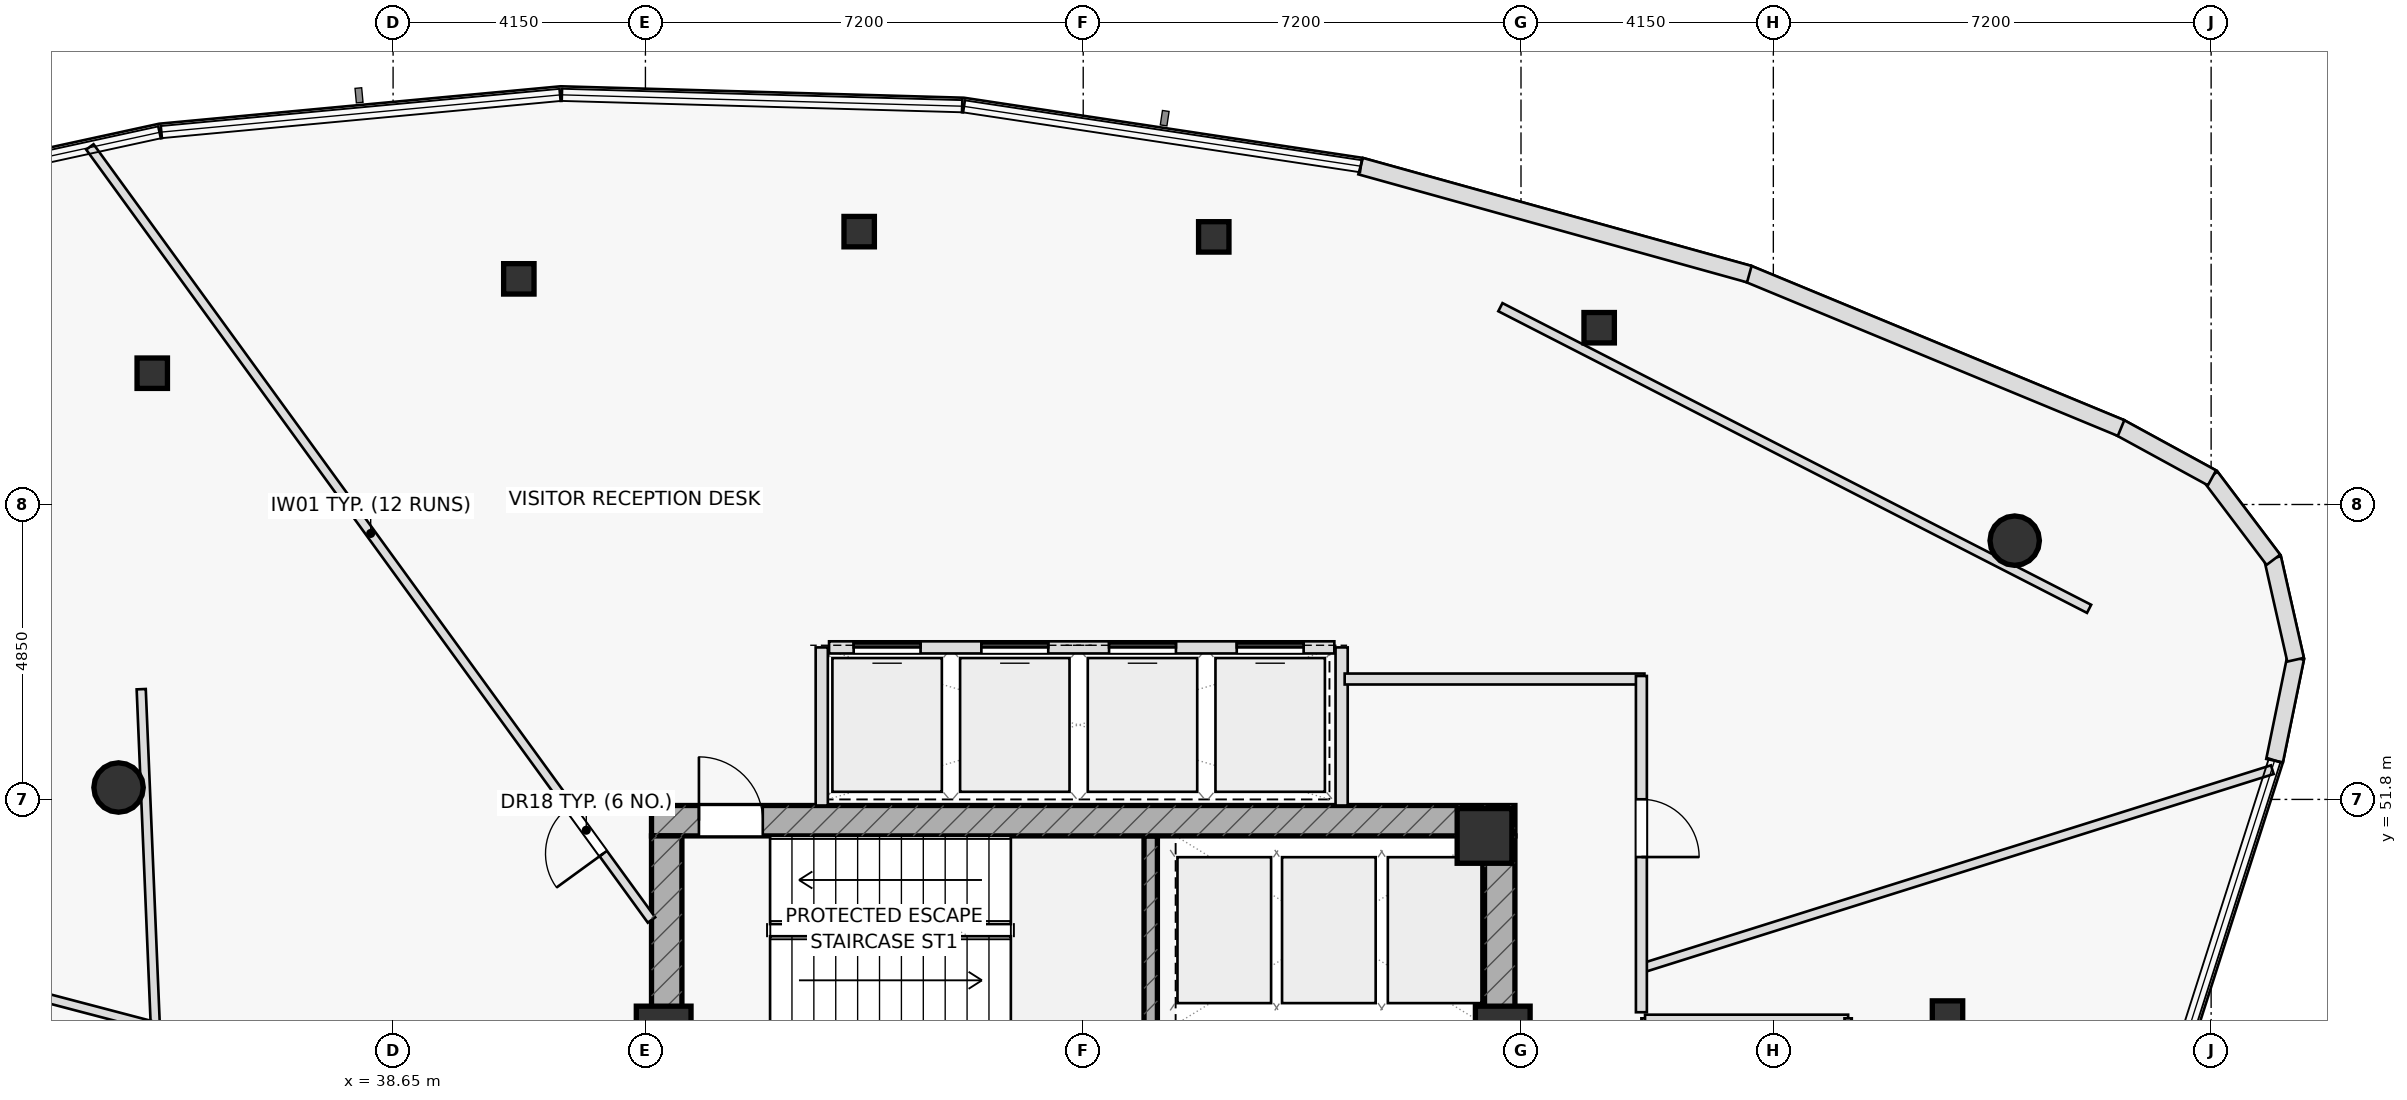
"""IFC4 building model, lengths in metres.
Left out: names, types, materials, properties, quantities, classifications, styles, units other than length and angle.
Written with IfcOpenShell. Run it as: python <this file> out.ifc"""

import sys

from ifc_helpers import new_model, si_unit, direction, frame, frame_2d, origin, origin_2d, place, context, subcontext, project, spatial, rectangle, hollow_rectangle, hollow_circle, extrude, element, fill, save


model = new_model("IFC4")
c1 = context("Model", 3, precision=1e-05, world=origin(), true_north=direction((0.0, 1.0)))
c2 = subcontext(c1, "Body", "Model", "MODEL_VIEW")
j1 = project(units=[si_unit("LENGTHUNIT", "METRE"), si_unit("PLANEANGLEUNIT", "RADIAN")], contexts=[c1])
p1 = place(None, origin())
s1 = spatial("IfcSite", under=j1, at=p1, CompositionType="ELEMENT")
p2 = place(p1, origin())
s2 = spatial("IfcBuilding", under=s1, at=p2, CompositionType="ELEMENT")
p3 = place(p2, frame((0.0, 0.0, 273.5)))
s3 = spatial("IfcBuildingStorey", under=s2, at=p3, CompositionType="ELEMENT", Elevation=273.5)
p4 = place(p3, frame((51.11, 48.1, 0.0), z_axis=(0.0, 0.0, 1.0), x_axis=(0.0, 1.0, 0.0)))
e1 = element("IfcWall", 1, at=p4, inside=s3, PredefinedType="SHEAR", context=c2, shape_type="SweptSolid", body=[
    extrude(rectangle(XDim=3.1, YDim=0.22, at=frame_2d((1.55, 0.0))), origin(), (0.0, 0.0, 1.0), 3.7),
])
p5 = place(p3, frame((42.9, 51.45, 0.0), z_axis=(0.0, 0.0, 1.0), x_axis=(1.0, 0.0, 0.0)))
e2 = element("IfcWall", 2, at=p5, inside=s3, PredefinedType="SHEAR", context=c2, shape_type="SweptSolid", body=[
    extrude(rectangle(XDim=14.2, YDim=0.5, at=frame_2d((7.1, 0.0))), origin(), (0.0, 0.0, 1.0), 3.7),
])
p6 = place(p5, frame((0.78, 0.0, 0.0)))
e3 = element("IfcOpeningElement", 3, at=p6, cuts=e2, PredefinedType="OPENING", context=c2, shape_type="SweptSolid", body=[
    extrude(rectangle(XDim=1.05, YDim=2.2, at=frame_2d((0.525, 1.1))), frame((0.0, 0.26, 0.0), z_axis=(0.0, -1.0, 0.0), x_axis=(1.0, 0.0, 0.0)), (0.0, 0.0, 1.0), 0.52),
])
p7 = place(p3, frame((43.15, 38.8, 0.0), z_axis=(0.0, 0.0, 1.0), x_axis=(0.0, 1.0, 0.0)))
e4 = element("IfcWall", 4, at=p7, inside=s3, PredefinedType="SHEAR", context=c2, shape_type="SweptSolid", body=[
    extrude(rectangle(XDim=12.4, YDim=0.5, at=frame_2d((6.2, 0.0))), origin(), (0.0, 0.0, 1.0), 3.7),
])
p8 = place(p3, frame((56.85, 38.8, 0.0), z_axis=(0.0, 0.0, 1.0), x_axis=(0.0, 1.0, 0.0)))
e5 = element("IfcWall", 5, at=p8, inside=s3, PredefinedType="SHEAR", context=c2, shape_type="SweptSolid", body=[
    extrude(rectangle(XDim=12.4, YDim=0.5, at=frame_2d((6.2, 0.0))), origin(), (0.0, 0.0, 1.0), 3.7),
])
p9 = place(p8, frame((3.85, 0.0, 0.0)))
e6 = element("IfcOpeningElement", 6, at=p9, cuts=e5, PredefinedType="OPENING", context=c2, shape_type="SweptSolid", body=[
    extrude(rectangle(XDim=1.5, YDim=2.2, at=frame_2d((0.75, 1.1))), frame((0.0, 0.26, 0.0), z_axis=(0.0, -1.0, 0.0), x_axis=(1.0, 0.0, 0.0)), (0.0, 0.0, 1.0), 0.52),
])
for number, where, z_axis, x_axis in (
    (7, (43.1, 47.95, 0.0), (0.0, 0.0, 1.0), (1.0, 0.0, 0.0)),
    (8, (56.9, 47.95, 0.0), (0.0, 0.0, 1.0), (1.0, 0.0, 0.0)),
    (9, (56.6, 51.2, 0.0), (0.0, 0.0, 1.0), (1.0, 0.0, 0.0)),
):
    element("IfcColumn", number, at=place(p3, frame(where, z_axis=z_axis, x_axis=x_axis)), inside=s3, PredefinedType="COLUMN", context=c2, shape_type="SweptSolid", body=[
        extrude(rectangle(XDim=0.9, YDim=0.9, at=origin_2d()), origin(), (0.0, 0.0, 1.0), 3.7),
    ])
p10 = place(p3, frame((34.135, 51.996, 0.0), z_axis=(0.0, 0.0, 1.0), x_axis=(1.0, 0.0, 0.0)))
e10 = element("IfcColumn", 10, at=p10, inside=s3, PredefinedType="COLUMN", context=c2, shape_type="SweptSolid", body=[
    extrude(hollow_circle(Radius=0.406, WallThickness=0.036, at=origin_2d()), origin(), (0.0, 0.0, 1.0), 3.7),
])
p11 = place(p3, frame((64.214, 48.237, 0.0), z_axis=(0.0, 0.0, 1.0), x_axis=(1.0, 0.0, 0.0)))
e11 = element("IfcColumn", 11, at=p11, inside=s3, PredefinedType="COLUMN", context=c2, shape_type="SweptSolid", body=[
    extrude(hollow_rectangle(XDim=0.5, YDim=0.5, WallThickness=0.03, at=origin_2d()), origin(), (0.0, 0.0, 1.0), 3.7),
])
p12 = place(p3, frame((65.32, 56.056, 0.0), z_axis=(0.0, 0.0, 1.0), x_axis=(1.0, 0.0, 0.0)))
e12 = element("IfcColumn", 12, at=p12, inside=s3, PredefinedType="COLUMN", context=c2, shape_type="SweptSolid", body=[
    extrude(hollow_circle(Radius=0.406, WallThickness=0.036, at=origin_2d()), origin(), (0.0, 0.0, 1.0), 3.7),
])
for number, where, z_axis, x_axis in (
    (13, (58.486, 59.557, 0.0), (0.0, 0.0, 1.0), (1.0, 0.0, 0.0)),
    (14, (52.147, 61.051, 0.0), (0.0, 0.0, 1.0), (1.0, 0.0, 0.0)),
    (15, (46.315, 61.137, 0.0), (0.0, 0.0, 1.0), (1.0, 0.0, 0.0)),
    (16, (40.718, 60.361, 0.0), (0.0, 0.0, 1.0), (1.0, 0.0, 0.0)),
    (17, (34.689, 58.809, 0.0), (0.0, 0.0, 1.0), (1.0, 0.0, 0.0)),
):
    element("IfcColumn", number, at=place(p3, frame(where, z_axis=z_axis, x_axis=x_axis)), inside=s3, PredefinedType="COLUMN", context=c2, shape_type="SweptSolid", body=[
        extrude(hollow_rectangle(XDim=0.5, YDim=0.5, WallThickness=0.03, at=origin_2d()), origin(), (0.0, 0.0, 1.0), 3.7),
    ])
for number, where, z_axis, x_axis in (
    (18, (45.7, 51.7, 0.0), (0.0, 0.0, 1.0), (0.0, 1.0, 0.0)),
    (19, (54.25, 51.7, 0.0), (0.0, 0.0, 1.0), (0.0, 1.0, 0.0)),
):
    element("IfcWall", number, at=place(p3, frame(where, z_axis=z_axis, x_axis=x_axis)), inside=s3, PredefinedType="PARTITIONING", context=c2, shape_type="SweptSolid", body=[
        extrude(rectangle(XDim=2.6, YDim=0.2, at=frame_2d((1.3, 0.0))), origin(), (0.0, 0.0, 1.0), 3.7),
    ])
p13 = place(p3, frame((34.507, 53.613, 0.0), z_axis=(0.0, 0.0, 1.0), x_axis=(0.041875090182, -0.999122853718, 0.0)))
e20 = element("IfcWall", 20, at=p13, inside=s3, PredefinedType="PARTITIONING", context=c2, shape_type="SweptSolid", body=[
    extrude(rectangle(XDim=8.139, YDim=0.15, at=frame_2d((4.069, 0.0))), origin(), (0.0, 0.0, 1.0), 3.235),
])
p14 = place(p3, frame((66.543, 54.934, 0.0), z_axis=(0.0, 0.0, 1.0), x_axis=(-0.889966951661, 0.456025026673, 0.0)))
e21 = element("IfcWall", 21, at=p14, inside=s3, PredefinedType="PARTITIONING", context=c2, shape_type="SweptSolid", body=[
    extrude(rectangle(XDim=10.879, YDim=0.15, at=frame_2d((5.439, 0.0))), origin(), (0.0, 0.0, 1.0), 3.235),
])
p15 = place(p3, frame((59.24, 41.2, 0.0), z_axis=(0.0, 0.0, 1.0), x_axis=(0.0, 1.0, 0.0)))
e22 = element("IfcWall", 22, at=p15, inside=s3, PredefinedType="PARTITIONING", context=c2, shape_type="SweptSolid", body=[
    extrude(rectangle(XDim=7.0, YDim=0.12, at=frame_2d((3.5, 0.0))), origin(), (0.0, 0.0, 1.0), 3.7),
])
p16 = place(p15, frame((1.15, 0.0, 0.0)))
e23 = element("IfcOpeningElement", 23, at=p16, cuts=e22, PredefinedType="OPENING", context=c2, shape_type="SweptSolid", body=[
    extrude(rectangle(XDim=0.9, YDim=2.05, at=frame_2d((0.45, 1.025))), frame((0.0, 0.07, 0.0), z_axis=(0.0, -1.0, 0.0), x_axis=(1.0, 0.0, 0.0)), (0.0, 0.0, 1.0), 0.14),
])
p17 = place(p15, frame((4.7, 0.0, 0.0)))
e24 = element("IfcOpeningElement", 24, at=p17, cuts=e22, PredefinedType="OPENING", context=c2, shape_type="SweptSolid", body=[
    extrude(rectangle(XDim=0.9, YDim=2.05, at=frame_2d((0.45, 1.025))), frame((0.0, 0.07, 0.0), z_axis=(0.0, -1.0, 0.0), x_axis=(1.0, 0.0, 0.0)), (0.0, 0.0, 1.0), 0.14),
])
p18 = place(p3, frame((59.24, 48.2, 0.0), z_axis=(0.0, 0.0, 1.0), x_axis=(1.0, 0.0, 0.0)))
e25 = element("IfcWall", 25, at=p18, inside=s3, PredefinedType="PARTITIONING", context=c2, shape_type="SweptSolid", body=[
    extrude(rectangle(XDim=3.34, YDim=0.12, at=frame_2d((1.67, 0.0))), origin(), (0.0, 0.0, 1.0), 3.7),
])
p19 = place(p3, frame((62.58, 41.2, 0.0), z_axis=(0.0, 0.0, 1.0), x_axis=(0.0, 1.0, 0.0)))
e26 = element("IfcWall", 26, at=p19, inside=s3, PredefinedType="PARTITIONING", context=c2, shape_type="SweptSolid", body=[
    extrude(rectangle(XDim=7.0, YDim=0.12, at=frame_2d((3.5, 0.0))), origin(), (0.0, 0.0, 1.0), 3.235),
])
p20 = place(p3, frame((42.9, 49.817, 0.0), z_axis=(0.0, 0.0, 1.0), x_axis=(-0.587778112671, 0.809022181565, 0.0)))
e27 = element("IfcWall", 27, at=p20, inside=s3, PredefinedType="PARTITIONING", context=c2, shape_type="SweptSolid", body=[
    extrude(rectangle(XDim=15.715, YDim=0.15, at=frame_2d((7.857, 0.0))), origin(), (0.0, 0.0, 1.0), 3.175),
])
p21 = place(p20, frame((1.35, 0.0, 0.0)))
e28 = element("IfcOpeningElement", 28, at=p21, cuts=e27, PredefinedType="OPENING", context=c2, shape_type="SweptSolid", body=[
    extrude(rectangle(XDim=0.95, YDim=2.05, at=frame_2d((0.475, 1.025))), frame((0.0, 0.085, 0.0), z_axis=(0.0, -1.0, 0.0), x_axis=(1.0, 0.0, 0.0)), (0.0, 0.0, 1.0), 0.17),
])
p22 = place(p3, frame((37.08, 47.448, 0.0), z_axis=(0.0, 0.0, 1.0), x_axis=(-0.967188641059, 0.254059309232, 0.0)))
e29 = element("IfcWall", 29, at=p22, inside=s3, PredefinedType="PARTITIONING", context=c2, shape_type="SweptSolid", body=[
    extrude(rectangle(XDim=11.797, YDim=0.15, at=frame_2d((5.898, 0.0))), origin(), (0.0, 0.0, 1.0), 3.175),
])
p23 = place(p3, frame((59.18, 49.023, 0.0), z_axis=(0.0, 0.0, 1.0), x_axis=(0.953863772669, 0.300239742854, 0.0)))
e30 = element("IfcWall", 30, at=p23, inside=s3, PredefinedType="PARTITIONING", context=c2, shape_type="SweptSolid", body=[
    extrude(rectangle(XDim=10.878, YDim=0.15, at=frame_2d((5.439, 0.0))), origin(), (0.0, 0.0, 1.0), 3.175),
])
p24 = place(p3, frame((54.3, 53.78, 0.0), z_axis=(0.0, 0.0, 1.0), x_axis=(1.0, 0.0, 0.0)))
e31 = element("IfcWall", 31, at=p24, inside=s3, PredefinedType="PARTITIONING", context=c2, shape_type="SweptSolid", body=[
    extrude(rectangle(XDim=4.93, YDim=0.18, at=frame_2d((2.465, 0.0))), origin(), (0.0, 0.0, 1.0), 3.7),
])
p25 = place(p3, frame((59.18, 53.83, 0.0), z_axis=(0.0, 0.0, 1.0), x_axis=(0.0, -1.0, 0.0)))
e32 = element("IfcWall", 32, at=p25, inside=s3, PredefinedType="PARTITIONING", context=c2, shape_type="SweptSolid", body=[
    extrude(rectangle(XDim=5.53, YDim=0.18, at=frame_2d((2.765, 0.0))), origin(), (0.0, 0.0, 1.0), 3.7),
])
p26 = place(p25, frame((2.028, 0.0, 0.0)))
e33 = element("IfcOpeningElement", 33, at=p26, cuts=e32, PredefinedType="OPENING", context=c2, shape_type="SweptSolid", body=[
    extrude(rectangle(XDim=0.95, YDim=2.05, at=frame_2d((0.475, 1.025))), frame((0.0, 0.1, 0.0), z_axis=(0.0, -1.0, 0.0), x_axis=(1.0, 0.0, 0.0)), (0.0, 0.0, 1.0), 0.2),
])
p27 = place(p3, frame((69.594, 52.438, 0.0), z_axis=(0.0, 0.0, 1.0), x_axis=(0.200254120107, 0.979743990734, 0.0)))
e34 = element("IfcWall", 34, at=p27, inside=s3, PredefinedType="STANDARD", context=c2, shape_type="SweptSolid", body=[
    extrude(rectangle(XDim=1.724, YDim=0.28, at=frame_2d((0.862, 0.0))), origin(), (0.0, 0.0, 1.0), 3.7),
])
p28 = place(p3, frame((69.939, 54.097, 0.0), z_axis=(0.0, 0.0, 1.0), x_axis=(-0.22073351924, 0.975334154782, 0.0)))
e35 = element("IfcWall", 35, at=p28, inside=s3, PredefinedType="STANDARD", context=c2, shape_type="SweptSolid", body=[
    extrude(rectangle(XDim=1.712, YDim=0.28, at=frame_2d((0.856, 0.0))), origin(), (0.0, 0.0, 1.0), 3.7),
])
p29 = place(p3, frame((69.573, 55.74, 0.0), z_axis=(0.0, 0.0, 1.0), x_axis=(-0.602346921817, 0.798234417811, 0.0)))
e36 = element("IfcWall", 36, at=p29, inside=s3, PredefinedType="STANDARD", context=c2, shape_type="SweptSolid", body=[
    extrude(rectangle(XDim=1.712, YDim=0.28, at=frame_2d((0.856, 0.0))), origin(), (0.0, 0.0, 1.0), 3.7),
])
p30 = place(p3, frame((68.564, 57.088, 0.0), z_axis=(0.0, 0.0, 1.0), x_axis=(-0.877599648499, 0.479394260452, 0.0)))
e37 = element("IfcWall", 37, at=p30, inside=s3, PredefinedType="STANDARD", context=c2, shape_type="SweptSolid", body=[
    extrude(rectangle(XDim=1.735, YDim=0.28, at=frame_2d((0.868, 0.0))), origin(), (0.0, 0.0, 1.0), 3.7),
])
p31 = place(p3, frame((67.069, 57.907, 0.0), z_axis=(0.0, 0.0, 1.0), x_axis=(-0.92404009985, 0.382295558264, 0.0)))
e38 = element("IfcWall", 38, at=p31, inside=s3, PredefinedType="STANDARD", context=c2, shape_type="SweptSolid", body=[
    extrude(rectangle(XDim=6.647, YDim=0.28, at=frame_2d((3.323, 0.0))), origin(), (0.0, 0.0, 1.0), 3.7),
])
p32 = place(p3, frame((60.955, 60.438, 0.0), z_axis=(0.0, 0.0, 1.0), x_axis=(-0.963502092463, 0.267700799063, 0.0)))
e39 = element("IfcWall", 39, at=p32, inside=s3, PredefinedType="STANDARD", context=c2, shape_type="SweptSolid", body=[
    extrude(rectangle(XDim=6.635, YDim=0.28, at=frame_2d((3.317, 0.0))), origin(), (0.0, 0.0, 1.0), 3.7),
])
p33 = place(p3, frame((45.82, 54.3, 0.0), z_axis=(0.0, 0.0, 1.0), x_axis=(1.0, 0.0, 0.0)))
e40 = element("IfcWall", 40, at=p33, inside=s3, PredefinedType="PARTITIONING", context=c2, shape_type="SweptSolid", body=[
    extrude(rectangle(XDim=8.31, YDim=0.2, at=frame_2d((4.155, 0.0))), origin(), (0.0, 0.0, 1.0), 3.7),
])
p34 = place(p33, frame((0.405, 0.0, 0.0)))
e41 = element("IfcOpeningElement", 41, at=p34, cuts=e40, PredefinedType="OPENING", context=c2, shape_type="SweptSolid", body=[
    extrude(rectangle(XDim=1.1, YDim=2.15, at=frame_2d((0.55, 1.075))), frame((0.0, 0.11, 0.0), z_axis=(0.0, -1.0, 0.0), x_axis=(1.0, 0.0, 0.0)), (0.0, 0.0, 1.0), 0.22),
])
p35 = place(p33, frame((2.505, 0.0, 0.0)))
e42 = element("IfcOpeningElement", 42, at=p35, cuts=e40, PredefinedType="OPENING", context=c2, shape_type="SweptSolid", body=[
    extrude(rectangle(XDim=1.1, YDim=2.15, at=frame_2d((0.55, 1.075))), frame((0.0, 0.11, 0.0), z_axis=(0.0, -1.0, 0.0), x_axis=(1.0, 0.0, 0.0)), (0.0, 0.0, 1.0), 0.22),
])
p36 = place(p33, frame((4.605, 0.0, 0.0)))
e43 = element("IfcOpeningElement", 43, at=p36, cuts=e40, PredefinedType="OPENING", context=c2, shape_type="SweptSolid", body=[
    extrude(rectangle(XDim=1.1, YDim=2.15, at=frame_2d((0.55, 1.075))), frame((0.0, 0.11, 0.0), z_axis=(0.0, -1.0, 0.0), x_axis=(1.0, 0.0, 0.0)), (0.0, 0.0, 1.0), 0.22),
])
p37 = place(p33, frame((6.705, 0.0, 0.0)))
e44 = element("IfcOpeningElement", 44, at=p37, cuts=e40, PredefinedType="OPENING", context=c2, shape_type="SweptSolid", body=[
    extrude(rectangle(XDim=1.1, YDim=2.15, at=frame_2d((0.55, 1.075))), frame((0.0, 0.11, 0.0), z_axis=(0.0, -1.0, 0.0), x_axis=(1.0, 0.0, 0.0)), (0.0, 0.0, 1.0), 0.22),
])
p38 = place(p6, origin())
e45 = element("IfcDoor", 45, at=p38, inside=s3, OperationType="SINGLE_SWING_LEFT", PredefinedType="DOOR", context=c2, shape_type="SweptSolid", body=[
    extrude(rectangle(XDim=1.05, YDim=2.2, at=frame_2d((0.525, 1.1))), frame((0.0, 0.025, 0.0), z_axis=(0.0, -1.0, 0.0), x_axis=(1.0, 0.0, 0.0)), (0.0, 0.0, 1.0), 0.05),
])
fill(e3, e45)
p39 = place(p21, origin())
e46 = element("IfcDoor", 46, at=p39, inside=s3, OperationType="SINGLE_SWING_LEFT", PredefinedType="DOOR", context=c2, shape_type="SweptSolid", body=[
    extrude(rectangle(XDim=0.95, YDim=2.05, at=frame_2d((0.475, 1.025))), frame((0.0, 0.025, 0.0), z_axis=(0.0, -1.0, 0.0), x_axis=(1.0, 0.0, 0.0)), (0.0, 0.0, 1.0), 0.05),
])
fill(e28, e46)
p40 = place(p26, origin())
e47 = element("IfcDoor", 47, at=p40, inside=s3, OperationType="SINGLE_SWING_RIGHT", PredefinedType="DOOR", context=c2, shape_type="SweptSolid", body=[
    extrude(rectangle(XDim=0.95, YDim=2.05, at=frame_2d((0.475, 1.025))), frame((0.0, 0.025, 0.0), z_axis=(0.0, -1.0, 0.0), x_axis=(1.0, 0.0, 0.0)), (0.0, 0.0, 1.0), 0.05),
])
fill(e33, e47)
p41 = place(p34, origin())
e48 = element("IfcDoor", 48, at=p41, inside=s3, OperationType="SLIDING_TO_LEFT", PredefinedType="DOOR", context=c2, shape_type="SweptSolid", body=[
    extrude(rectangle(XDim=1.1, YDim=2.15, at=frame_2d((0.55, 1.075))), frame((0.0, 0.025, 0.0), z_axis=(0.0, -1.0, 0.0), x_axis=(1.0, 0.0, 0.0)), (0.0, 0.0, 1.0), 0.05),
])
fill(e41, e48)
p42 = place(p35, origin())
e49 = element("IfcDoor", 49, at=p42, inside=s3, OperationType="SLIDING_TO_RIGHT", PredefinedType="DOOR", context=c2, shape_type="SweptSolid", body=[
    extrude(rectangle(XDim=1.1, YDim=2.15, at=frame_2d((0.55, 1.075))), frame((0.0, 0.025, 0.0), z_axis=(0.0, -1.0, 0.0), x_axis=(1.0, 0.0, 0.0)), (0.0, 0.0, 1.0), 0.05),
])
fill(e42, e49)
p43 = place(p36, origin())
e50 = element("IfcDoor", 50, at=p43, inside=s3, OperationType="SLIDING_TO_LEFT", PredefinedType="DOOR", context=c2, shape_type="SweptSolid", body=[
    extrude(rectangle(XDim=1.1, YDim=2.15, at=frame_2d((0.55, 1.075))), frame((0.0, 0.025, 0.0), z_axis=(0.0, -1.0, 0.0), x_axis=(1.0, 0.0, 0.0)), (0.0, 0.0, 1.0), 0.05),
])
fill(e43, e50)
p44 = place(p37, origin())
e51 = element("IfcDoor", 51, at=p44, inside=s3, OperationType="SLIDING_TO_RIGHT", PredefinedType="DOOR", context=c2, shape_type="SweptSolid", body=[
    extrude(rectangle(XDim=1.1, YDim=2.15, at=frame_2d((0.55, 1.075))), frame((0.0, 0.025, 0.0), z_axis=(0.0, -1.0, 0.0), x_axis=(1.0, 0.0, 0.0)), (0.0, 0.0, 1.0), 0.05),
])
fill(e44, e51)
save(model, sys.argv[1])
